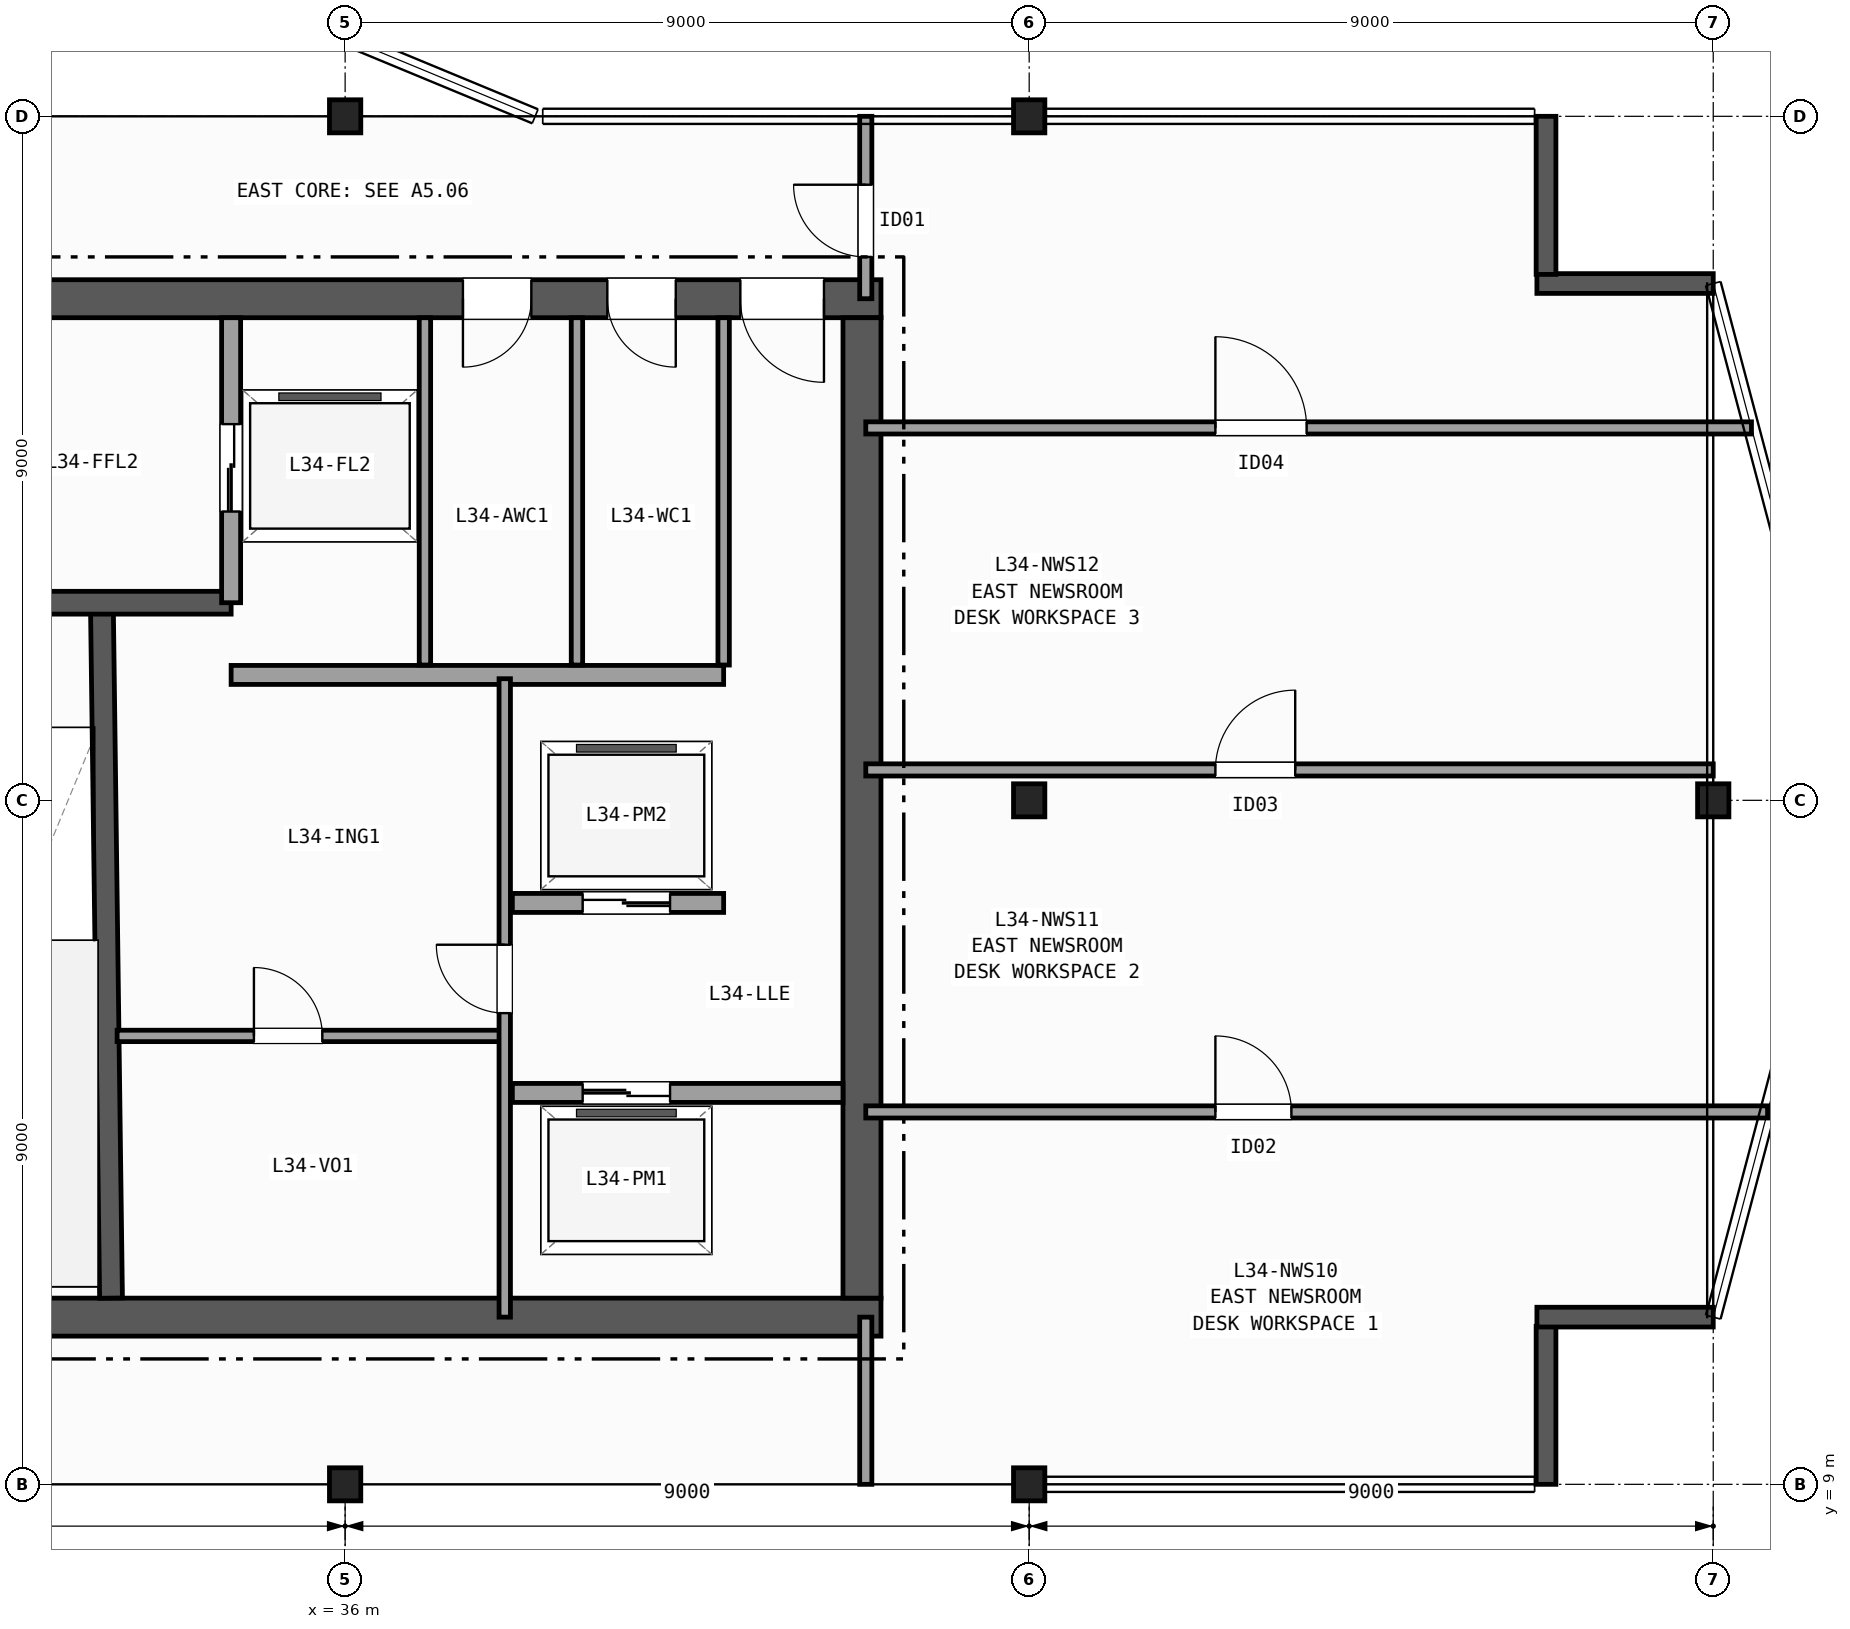
"""IFC4 building model, lengths in metres.
Left out: names, types, materials, properties, quantities, classifications, styles, units other than length and angle.
Written with IfcOpenShell. Run it as: python <this file> out.ifc"""

import sys

from ifc_helpers import new_model, si_unit, direction, frame, frame_2d, origin, origin_2d, place, context, subcontext, project, spatial, rectangle, i_section, extrude, element, fill, save


model = new_model("IFC4")
c1 = context("Model", 3, precision=1e-05, world=origin(), true_north=direction((0.0, 1.0)))
c2 = subcontext(c1, "Body", "Model", "MODEL_VIEW")
j1 = project(units=[si_unit("LENGTHUNIT", "METRE"), si_unit("PLANEANGLEUNIT", "RADIAN")], contexts=[c1])
p1 = place(None, origin())
s1 = spatial("IfcSite", under=j1, at=p1, CompositionType="ELEMENT")
p2 = place(p1, origin())
s2 = spatial("IfcBuilding", under=s1, at=p2, CompositionType="ELEMENT")
p3 = place(p2, frame((0.0, 0.0, 139.6)))
s3 = spatial("IfcBuildingStorey", under=s2, at=p3, CompositionType="ELEMENT", Elevation=139.6)
for number, where, z_axis, x_axis in (
    (1, (36.0, 9.0, 0.0), (0.0, 0.0, 1.0), (1.0, 0.0, 0.0)),
    (2, (36.0, 27.0, 0.0), (0.0, 0.0, 1.0), (1.0, 0.0, 0.0)),
    (3, (45.0, 9.0, 0.0), (0.0, 0.0, 1.0), (1.0, 0.0, 0.0)),
    (4, (45.0, 18.0, 0.0), (0.0, 0.0, 1.0), (1.0, 0.0, 0.0)),
    (5, (45.0, 27.0, 0.0), (0.0, 0.0, 1.0), (1.0, 0.0, 0.0)),
    (6, (54.0, 18.0, 0.0), (0.0, 0.0, 1.0), (1.0, 0.0, 0.0)),
):
    element("IfcColumn", number, at=place(p3, frame(where, z_axis=z_axis, x_axis=x_axis)), inside=s3, PredefinedType="COLUMN", context=c2, shape_type="SweptSolid", body=[
        extrude(i_section(OverallWidth=0.412, OverallDepth=0.435, WebThickness=0.036, FlangeThickness=0.057, FilletRadius=0.015, at=origin_2d()), origin(), (0.0, 0.0, 1.0), 3.7),
    ])
p4 = place(p3, frame((51.8, 9.0, 0.0), z_axis=(0.0, 0.0, 1.0), x_axis=(0.0, 1.0, 0.0)))
e7 = element("IfcWall", 7, at=p4, inside=s3, PredefinedType="SOLIDWALL", context=c2, shape_type="SweptSolid", body=[
    extrude(rectangle(XDim=2.08, YDim=0.26, at=frame_2d((1.04, 0.0))), origin(), (0.0, 0.0, 1.0), 3.42),
])
for number, where, z_axis, x_axis in (
    (8, (51.68, 11.2, 0.0), (0.0, 0.0, 1.0), (1.0, 0.0, 0.0)),
    (9, (54.0, 24.8, 0.0), (0.0, 0.0, 1.0), (-1.0, 0.0, 0.0)),
):
    element("IfcWall", number, at=place(p3, frame(where, z_axis=z_axis, x_axis=x_axis)), inside=s3, PredefinedType="SOLIDWALL", context=c2, shape_type="SweptSolid", body=[
        extrude(rectangle(XDim=2.32, YDim=0.26, at=frame_2d((1.16, 0.0))), origin(), (0.0, 0.0, 1.0), 3.42),
    ])
p5 = place(p3, frame((51.8, 24.92, 0.0), z_axis=(0.0, 0.0, 1.0), x_axis=(0.0, 1.0, 0.0)))
e10 = element("IfcWall", 10, at=p5, inside=s3, PredefinedType="SOLIDWALL", context=c2, shape_type="SweptSolid", body=[
    extrude(rectangle(XDim=2.08, YDim=0.26, at=frame_2d((1.04, 0.0))), origin(), (0.0, 0.0, 1.0), 3.42),
])
p6 = place(p3, frame((29.15, 11.2, 0.0), z_axis=(0.0, 0.0, 1.0), x_axis=(1.0, 0.0, 0.0)))
e11 = element("IfcWall", 11, at=p6, inside=s3, PredefinedType="SHEAR", context=c2, shape_type="SweptSolid", body=[
    extrude(rectangle(XDim=13.9, YDim=0.5, at=frame_2d((6.95, 0.0))), origin(), (0.0, 0.0, 1.0), 3.42),
])
p7 = place(p3, frame((43.05, 24.6, 0.0), z_axis=(0.0, 0.0, 1.0), x_axis=(-1.0, 0.0, 0.0)))
e12 = element("IfcWall", 12, at=p7, inside=s3, PredefinedType="SHEAR", context=c2, shape_type="SweptSolid", body=[
    extrude(rectangle(XDim=13.9, YDim=0.5, at=frame_2d((6.95, 0.0))), origin(), (0.0, 0.0, 1.0), 3.42),
])
p8 = place(p7, frame((0.75, 0.0, 0.0)))
e13 = element("IfcOpeningElement", 13, at=p8, cuts=e12, PredefinedType="OPENING", context=c2, shape_type="SweptSolid", body=[
    extrude(rectangle(XDim=1.1, YDim=2.15, at=frame_2d((0.55, 1.075))), frame((0.0, 0.26, 0.0), z_axis=(0.0, -1.0, 0.0), x_axis=(1.0, 0.0, 0.0)), (0.0, 0.0, 1.0), 0.52),
])
p9 = place(p7, frame((2.7, 0.0, 0.0)))
e14 = element("IfcOpeningElement", 14, at=p9, cuts=e12, PredefinedType="OPENING", context=c2, shape_type="SweptSolid", body=[
    extrude(rectangle(XDim=0.9, YDim=2.1, at=frame_2d((0.45, 1.05))), frame((0.0, 0.26, 0.0), z_axis=(0.0, -1.0, 0.0), x_axis=(1.0, 0.0, 0.0)), (0.0, 0.0, 1.0), 0.52),
])
p10 = place(p7, frame((4.6, 0.0, 0.0)))
e15 = element("IfcOpeningElement", 15, at=p10, cuts=e12, PredefinedType="OPENING", context=c2, shape_type="SweptSolid", body=[
    extrude(rectangle(XDim=0.9, YDim=2.1, at=frame_2d((0.45, 1.05))), frame((0.0, 0.26, 0.0), z_axis=(0.0, -1.0, 0.0), x_axis=(1.0, 0.0, 0.0)), (0.0, 0.0, 1.0), 0.52),
])
p11 = place(p3, frame((42.8, 11.45, 0.0), z_axis=(0.0, 0.0, 1.0), x_axis=(0.0, 1.0, 0.0)))
e16 = element("IfcWall", 16, at=p11, inside=s3, PredefinedType="SHEAR", context=c2, shape_type="SweptSolid", body=[
    extrude(rectangle(XDim=12.9, YDim=0.5, at=frame_2d((6.45, 0.0))), origin(), (0.0, 0.0, 1.0), 3.42),
])
p12 = place(p3, frame((32.92, 11.45, 0.0), z_axis=(0.0, 0.0, 1.0), x_axis=(-0.013171578211, 0.999913251001, 0.0)))
e17 = element("IfcWall", 17, at=p12, inside=s3, PredefinedType="SHEAR", context=c2, shape_type="SweptSolid", body=[
    extrude(rectangle(XDim=9.101, YDim=0.3, at=frame_2d((4.55, 0.0))), origin(), (0.0, 0.0, 1.0), 3.42),
])
p13 = place(p3, frame((34.5, 20.6, 0.0), z_axis=(0.0, 0.0, 1.0), x_axis=(-1.0, 0.0, 0.0)))
e18 = element("IfcWall", 18, at=p13, inside=s3, PredefinedType="SHEAR", context=c2, shape_type="SweptSolid", body=[
    extrude(rectangle(XDim=4.85, YDim=0.3, at=frame_2d((2.425, 0.0))), origin(), (0.0, 0.0, 1.0), 3.42),
])
p14 = place(p13, frame((2.7, 0.0, 0.0)))
e19 = element("IfcOpeningElement", 19, at=p14, cuts=e18, PredefinedType="OPENING", context=c2, shape_type="SweptSolid", body=[
    extrude(rectangle(XDim=1.2, YDim=2.15, at=frame_2d((0.6, 1.075))), frame((0.0, 0.16, 0.0), z_axis=(0.0, -1.0, 0.0), x_axis=(1.0, 0.0, 0.0)), (0.0, 0.0, 1.0), 0.32),
])
p15 = place(p3, frame((34.5, 20.6, 0.0), z_axis=(0.0, 0.0, 1.0), x_axis=(0.0, 1.0, 0.0)))
e20 = element("IfcWall", 20, at=p15, inside=s3, PredefinedType="PARTITIONING", context=c2, shape_type="SweptSolid", body=[
    extrude(rectangle(XDim=3.75, YDim=0.25, at=frame_2d((1.875, 0.0))), origin(), (0.0, 0.0, 1.0), 3.42),
])
p16 = place(p15, frame((1.2, 0.0, 0.0)))
e21 = element("IfcOpeningElement", 21, at=p16, cuts=e20, PredefinedType="OPENING", context=c2, shape_type="SweptSolid", body=[
    extrude(rectangle(XDim=1.15, YDim=2.15, at=frame_2d((0.575, 1.075))), frame((0.0, 0.135, 0.0), z_axis=(0.0, -1.0, 0.0), x_axis=(1.0, 0.0, 0.0)), (0.0, 0.0, 1.0), 0.27),
])
p17 = place(p3, frame((34.5, 19.65, 0.0), z_axis=(0.0, 0.0, 1.0), x_axis=(1.0, 0.0, 0.0)))
e22 = element("IfcWall", 22, at=p17, inside=s3, PredefinedType="PARTITIONING", context=c2, shape_type="SweptSolid", body=[
    extrude(rectangle(XDim=6.48, YDim=0.25, at=frame_2d((3.24, 0.0))), origin(), (0.0, 0.0, 1.0), 3.42),
])
p18 = place(p3, frame((38.2, 14.15, 0.0), z_axis=(0.0, 0.0, 1.0), x_axis=(1.0, 0.0, 0.0)))
e23 = element("IfcWall", 23, at=p18, inside=s3, PredefinedType="PARTITIONING", context=c2, shape_type="SweptSolid", body=[
    extrude(rectangle(XDim=4.35, YDim=0.25, at=frame_2d((2.175, 0.0))), origin(), (0.0, 0.0, 1.0), 3.42),
])
p19 = place(p18, frame((0.925, 0.0, 0.0)))
e24 = element("IfcOpeningElement", 24, at=p19, cuts=e23, PredefinedType="OPENING", context=c2, shape_type="SweptSolid", body=[
    extrude(rectangle(XDim=1.15, YDim=2.15, at=frame_2d((0.575, 1.075))), frame((0.0, 0.135, 0.0), z_axis=(0.0, -1.0, 0.0), x_axis=(1.0, 0.0, 0.0)), (0.0, 0.0, 1.0), 0.27),
])
p20 = place(p3, frame((40.98, 16.65, 0.0), z_axis=(0.0, 0.0, 1.0), x_axis=(-1.0, 0.0, 0.0)))
e25 = element("IfcWall", 25, at=p20, inside=s3, PredefinedType="PARTITIONING", context=c2, shape_type="SweptSolid", body=[
    extrude(rectangle(XDim=2.78, YDim=0.25, at=frame_2d((1.39, 0.0))), origin(), (0.0, 0.0, 1.0), 3.42),
])
p21 = place(p20, frame((0.705, 0.0, 0.0)))
e26 = element("IfcOpeningElement", 26, at=p21, cuts=e25, PredefinedType="OPENING", context=c2, shape_type="SweptSolid", body=[
    extrude(rectangle(XDim=1.15, YDim=2.15, at=frame_2d((0.575, 1.075))), frame((0.0, 0.135, 0.0), z_axis=(0.0, -1.0, 0.0), x_axis=(1.0, 0.0, 0.0)), (0.0, 0.0, 1.0), 0.27),
])
p22 = place(p3, frame((33.0, 14.9, 0.0), z_axis=(0.0, 0.0, 1.0), x_axis=(1.0, 0.0, 0.0)))
e27 = element("IfcWall", 27, at=p22, inside=s3, PredefinedType="PARTITIONING", context=c2, shape_type="SweptSolid", body=[
    extrude(rectangle(XDim=5.1, YDim=0.15, at=frame_2d((2.55, 0.0))), origin(), (0.0, 0.0, 1.0), 3.42),
])
p23 = place(p22, frame((1.8, 0.0, 0.0)))
e28 = element("IfcOpeningElement", 28, at=p23, cuts=e27, PredefinedType="OPENING", context=c2, shape_type="SweptSolid", body=[
    extrude(rectangle(XDim=0.9, YDim=2.1, at=frame_2d((0.45, 1.05))), frame((0.0, 0.085, 0.0), z_axis=(0.0, -1.0, 0.0), x_axis=(1.0, 0.0, 0.0)), (0.0, 0.0, 1.0), 0.17),
])
p24 = place(p3, frame((38.1, 11.2, 0.0), z_axis=(0.0, 0.0, 1.0), x_axis=(0.0, 1.0, 0.0)))
e29 = element("IfcWall", 29, at=p24, inside=s3, PredefinedType="PARTITIONING", context=c2, shape_type="SweptSolid", body=[
    extrude(rectangle(XDim=8.4, YDim=0.15, at=frame_2d((4.2, 0.0))), origin(), (0.0, 0.0, 1.0), 3.42),
])
p25 = place(p24, frame((4.0, 0.0, 0.0)))
e30 = element("IfcOpeningElement", 30, at=p25, cuts=e29, PredefinedType="OPENING", context=c2, shape_type="SweptSolid", body=[
    extrude(rectangle(XDim=0.9, YDim=2.1, at=frame_2d((0.45, 1.05))), frame((0.0, 0.085, 0.0), z_axis=(0.0, -1.0, 0.0), x_axis=(1.0, 0.0, 0.0)), (0.0, 0.0, 1.0), 0.17),
])
for number, where, z_axis, x_axis in (
    (31, (37.05, 19.78, 0.0), (0.0, 0.0, 1.0), (0.0, 1.0, 0.0)),
    (32, (39.05, 19.78, 0.0), (0.0, 0.0, 1.0), (0.0, 1.0, 0.0)),
    (33, (40.98, 19.78, 0.0), (0.0, 0.0, 1.0), (0.0, 1.0, 0.0)),
):
    element("IfcWall", number, at=place(p3, frame(where, z_axis=z_axis, x_axis=x_axis)), inside=s3, PredefinedType="PARTITIONING", context=c2, shape_type="SweptSolid", body=[
        extrude(rectangle(XDim=4.57, YDim=0.15, at=frame_2d((2.285, 0.0))), origin(), (0.0, 0.0, 1.0), 3.42),
    ])
p26 = place(p3, frame((42.85, 9.0, 0.0), z_axis=(0.0, 0.0, 1.0), x_axis=(0.0, 1.0, 0.0)))
e34 = element("IfcWall", 34, at=p26, inside=s3, PredefinedType="PARTITIONING", context=c2, shape_type="SweptSolid", body=[
    extrude(rectangle(XDim=2.2, YDim=0.16, at=frame_2d((1.1, 0.0))), origin(), (0.0, 0.0, 1.0), 2.634),
])
p27 = place(p3, frame((42.85, 24.6, 0.0), z_axis=(0.0, 0.0, 1.0), x_axis=(0.0, 1.0, 0.0)))
e35 = element("IfcWall", 35, at=p27, inside=s3, PredefinedType="PARTITIONING", context=c2, shape_type="SweptSolid", body=[
    extrude(rectangle(XDim=2.4, YDim=0.16, at=frame_2d((1.2, 0.0))), origin(), (0.0, 0.0, 1.0), 2.634),
])
p28 = place(p27, frame((0.55, 0.0, 0.0)))
e36 = element("IfcOpeningElement", 36, at=p28, cuts=e35, PredefinedType="OPENING", context=c2, shape_type="SweptSolid", body=[
    extrude(rectangle(XDim=0.95, YDim=2.1, at=frame_2d((0.475, 1.05))), frame((0.0, 0.09, 0.0), z_axis=(0.0, -1.0, 0.0), x_axis=(1.0, 0.0, 0.0)), (0.0, 0.0, 1.0), 0.18),
])
p29 = place(p3, frame((42.85, 13.9, 0.0), z_axis=(0.0, 0.0, 1.0), x_axis=(1.0, 0.0, 0.0)))
e37 = element("IfcWall", 37, at=p29, inside=s3, PredefinedType="PARTITIONING", context=c2, shape_type="SweptSolid", body=[
    extrude(rectangle(XDim=11.865, YDim=0.16, at=frame_2d((5.933, 0.0))), origin(), (0.0, 0.0, 1.0), 3.42),
])
p30 = place(p29, frame((4.6, 0.0, 0.0)))
e38 = element("IfcOpeningElement", 38, at=p30, cuts=e37, PredefinedType="OPENING", context=c2, shape_type="SweptSolid", body=[
    extrude(rectangle(XDim=1.0, YDim=2.1, at=frame_2d((0.5, 1.05))), frame((0.0, 0.09, 0.0), z_axis=(0.0, -1.0, 0.0), x_axis=(1.0, 0.0, 0.0)), (0.0, 0.0, 1.0), 0.18),
])
p31 = place(p3, frame((42.85, 18.4, 0.0), z_axis=(0.0, 0.0, 1.0), x_axis=(1.0, 0.0, 0.0)))
e39 = element("IfcWall", 39, at=p31, inside=s3, PredefinedType="PARTITIONING", context=c2, shape_type="SweptSolid", body=[
    extrude(rectangle(XDim=11.15, YDim=0.16, at=frame_2d((5.575, 0.0))), origin(), (0.0, 0.0, 1.0), 3.42),
])
p32 = place(p31, frame((4.6, 0.0, 0.0)))
e40 = element("IfcOpeningElement", 40, at=p32, cuts=e39, PredefinedType="OPENING", context=c2, shape_type="SweptSolid", body=[
    extrude(rectangle(XDim=1.05, YDim=2.15, at=frame_2d((0.525, 1.075))), frame((0.0, 0.09, 0.0), z_axis=(0.0, -1.0, 0.0), x_axis=(1.0, 0.0, 0.0)), (0.0, 0.0, 1.0), 0.18),
])
p33 = place(p3, frame((42.85, 22.9, 0.0), z_axis=(0.0, 0.0, 1.0), x_axis=(1.0, 0.0, 0.0)))
e41 = element("IfcWall", 41, at=p33, inside=s3, PredefinedType="PARTITIONING", context=c2, shape_type="SweptSolid", body=[
    extrude(rectangle(XDim=11.653, YDim=0.16, at=frame_2d((5.826, 0.0))), origin(), (0.0, 0.0, 1.0), 3.42),
])
p34 = place(p33, frame((4.6, 0.0, 0.0)))
e42 = element("IfcOpeningElement", 42, at=p34, cuts=e41, PredefinedType="OPENING", context=c2, shape_type="SweptSolid", body=[
    extrude(rectangle(XDim=1.2, YDim=2.15, at=frame_2d((0.6, 1.075))), frame((0.0, 0.09, 0.0), z_axis=(0.0, -1.0, 0.0), x_axis=(1.0, 0.0, 0.0)), (0.0, 0.0, 1.0), 0.18),
])
p35 = place(p8, origin())
e43 = element("IfcDoor", 43, at=p35, inside=s3, OperationType="SINGLE_SWING_LEFT", PredefinedType="DOOR", context=c2, shape_type="SweptSolid", body=[
    extrude(rectangle(XDim=1.1, YDim=2.15, at=frame_2d((0.55, 1.075))), frame((0.0, 0.025, 0.0), z_axis=(0.0, -1.0, 0.0), x_axis=(1.0, 0.0, 0.0)), (0.0, 0.0, 1.0), 0.05),
])
fill(e13, e43)
p36 = place(p9, origin())
e44 = element("IfcDoor", 44, at=p36, inside=s3, OperationType="SINGLE_SWING_LEFT", PredefinedType="DOOR", context=c2, shape_type="SweptSolid", body=[
    extrude(rectangle(XDim=0.9, YDim=2.1, at=frame_2d((0.45, 1.05))), frame((0.0, 0.025, 0.0), z_axis=(0.0, -1.0, 0.0), x_axis=(1.0, 0.0, 0.0)), (0.0, 0.0, 1.0), 0.05),
])
fill(e14, e44)
p37 = place(p10, origin())
e45 = element("IfcDoor", 45, at=p37, inside=s3, OperationType="SINGLE_SWING_RIGHT", PredefinedType="DOOR", context=c2, shape_type="SweptSolid", body=[
    extrude(rectangle(XDim=0.9, YDim=2.1, at=frame_2d((0.45, 1.05))), frame((0.0, 0.025, 0.0), z_axis=(0.0, -1.0, 0.0), x_axis=(1.0, 0.0, 0.0)), (0.0, 0.0, 1.0), 0.05),
])
fill(e15, e45)
p38 = place(p16, origin())
e46 = element("IfcDoor", 46, at=p38, inside=s3, OperationType="DOUBLE_DOOR_SLIDING", PredefinedType="DOOR", context=c2, shape_type="SweptSolid", body=[
    extrude(rectangle(XDim=1.15, YDim=2.15, at=frame_2d((0.575, 1.075))), frame((0.0, 0.025, 0.0), z_axis=(0.0, -1.0, 0.0), x_axis=(1.0, 0.0, 0.0)), (0.0, 0.0, 1.0), 0.05),
])
fill(e21, e46)
p39 = place(p19, origin())
e47 = element("IfcDoor", 47, at=p39, inside=s3, OperationType="DOUBLE_DOOR_SLIDING", PredefinedType="DOOR", context=c2, shape_type="SweptSolid", body=[
    extrude(rectangle(XDim=1.15, YDim=2.15, at=frame_2d((0.575, 1.075))), frame((0.0, 0.025, 0.0), z_axis=(0.0, -1.0, 0.0), x_axis=(1.0, 0.0, 0.0)), (0.0, 0.0, 1.0), 0.05),
])
fill(e24, e47)
p40 = place(p21, origin())
e48 = element("IfcDoor", 48, at=p40, inside=s3, OperationType="DOUBLE_DOOR_SLIDING", PredefinedType="DOOR", context=c2, shape_type="SweptSolid", body=[
    extrude(rectangle(XDim=1.15, YDim=2.15, at=frame_2d((0.575, 1.075))), frame((0.0, 0.025, 0.0), z_axis=(0.0, -1.0, 0.0), x_axis=(1.0, 0.0, 0.0)), (0.0, 0.0, 1.0), 0.05),
])
fill(e26, e48)
p41 = place(p25, origin())
e49 = element("IfcDoor", 49, at=p41, inside=s3, OperationType="SINGLE_SWING_RIGHT", PredefinedType="DOOR", context=c2, shape_type="SweptSolid", body=[
    extrude(rectangle(XDim=0.9, YDim=2.1, at=frame_2d((0.45, 1.05))), frame((0.0, 0.025, 0.0), z_axis=(0.0, -1.0, 0.0), x_axis=(1.0, 0.0, 0.0)), (0.0, 0.0, 1.0), 0.05),
])
fill(e30, e49)
p42 = place(p23, origin())
e50 = element("IfcDoor", 50, at=p42, inside=s3, OperationType="SINGLE_SWING_LEFT", PredefinedType="DOOR", context=c2, shape_type="SweptSolid", body=[
    extrude(rectangle(XDim=0.9, YDim=2.1, at=frame_2d((0.45, 1.05))), frame((0.0, 0.025, 0.0), z_axis=(0.0, -1.0, 0.0), x_axis=(1.0, 0.0, 0.0)), (0.0, 0.0, 1.0), 0.05),
])
fill(e28, e50)
p43 = place(p28, origin())
e51 = element("IfcDoor", 51, at=p43, inside=s3, OperationType="SINGLE_SWING_RIGHT", PredefinedType="DOOR", context=c2, shape_type="SweptSolid", body=[
    extrude(rectangle(XDim=0.95, YDim=2.1, at=frame_2d((0.475, 1.05))), frame((0.0, 0.025, 0.0), z_axis=(0.0, -1.0, 0.0), x_axis=(1.0, 0.0, 0.0)), (0.0, 0.0, 1.0), 0.05),
])
fill(e36, e51)
p44 = place(p30, origin())
e52 = element("IfcDoor", 52, at=p44, inside=s3, OperationType="SINGLE_SWING_LEFT", PredefinedType="DOOR", context=c2, shape_type="SweptSolid", body=[
    extrude(rectangle(XDim=1.0, YDim=2.1, at=frame_2d((0.5, 1.05))), frame((0.0, 0.025, 0.0), z_axis=(0.0, -1.0, 0.0), x_axis=(1.0, 0.0, 0.0)), (0.0, 0.0, 1.0), 0.05),
])
fill(e38, e52)
p45 = place(p32, origin())
e53 = element("IfcDoor", 53, at=p45, inside=s3, OperationType="SINGLE_SWING_RIGHT", PredefinedType="DOOR", context=c2, shape_type="SweptSolid", body=[
    extrude(rectangle(XDim=1.05, YDim=2.15, at=frame_2d((0.525, 1.075))), frame((0.0, 0.025, 0.0), z_axis=(0.0, -1.0, 0.0), x_axis=(1.0, 0.0, 0.0)), (0.0, 0.0, 1.0), 0.05),
])
fill(e40, e53)
p46 = place(p34, origin())
e54 = element("IfcDoor", 54, at=p46, inside=s3, OperationType="SINGLE_SWING_LEFT", PredefinedType="DOOR", context=c2, shape_type="SweptSolid", body=[
    extrude(rectangle(XDim=1.2, YDim=2.15, at=frame_2d((0.6, 1.075))), frame((0.0, 0.025, 0.0), z_axis=(0.0, -1.0, 0.0), x_axis=(1.0, 0.0, 0.0)), (0.0, 0.0, 1.0), 0.05),
])
fill(e42, e54)
save(model, sys.argv[1])
